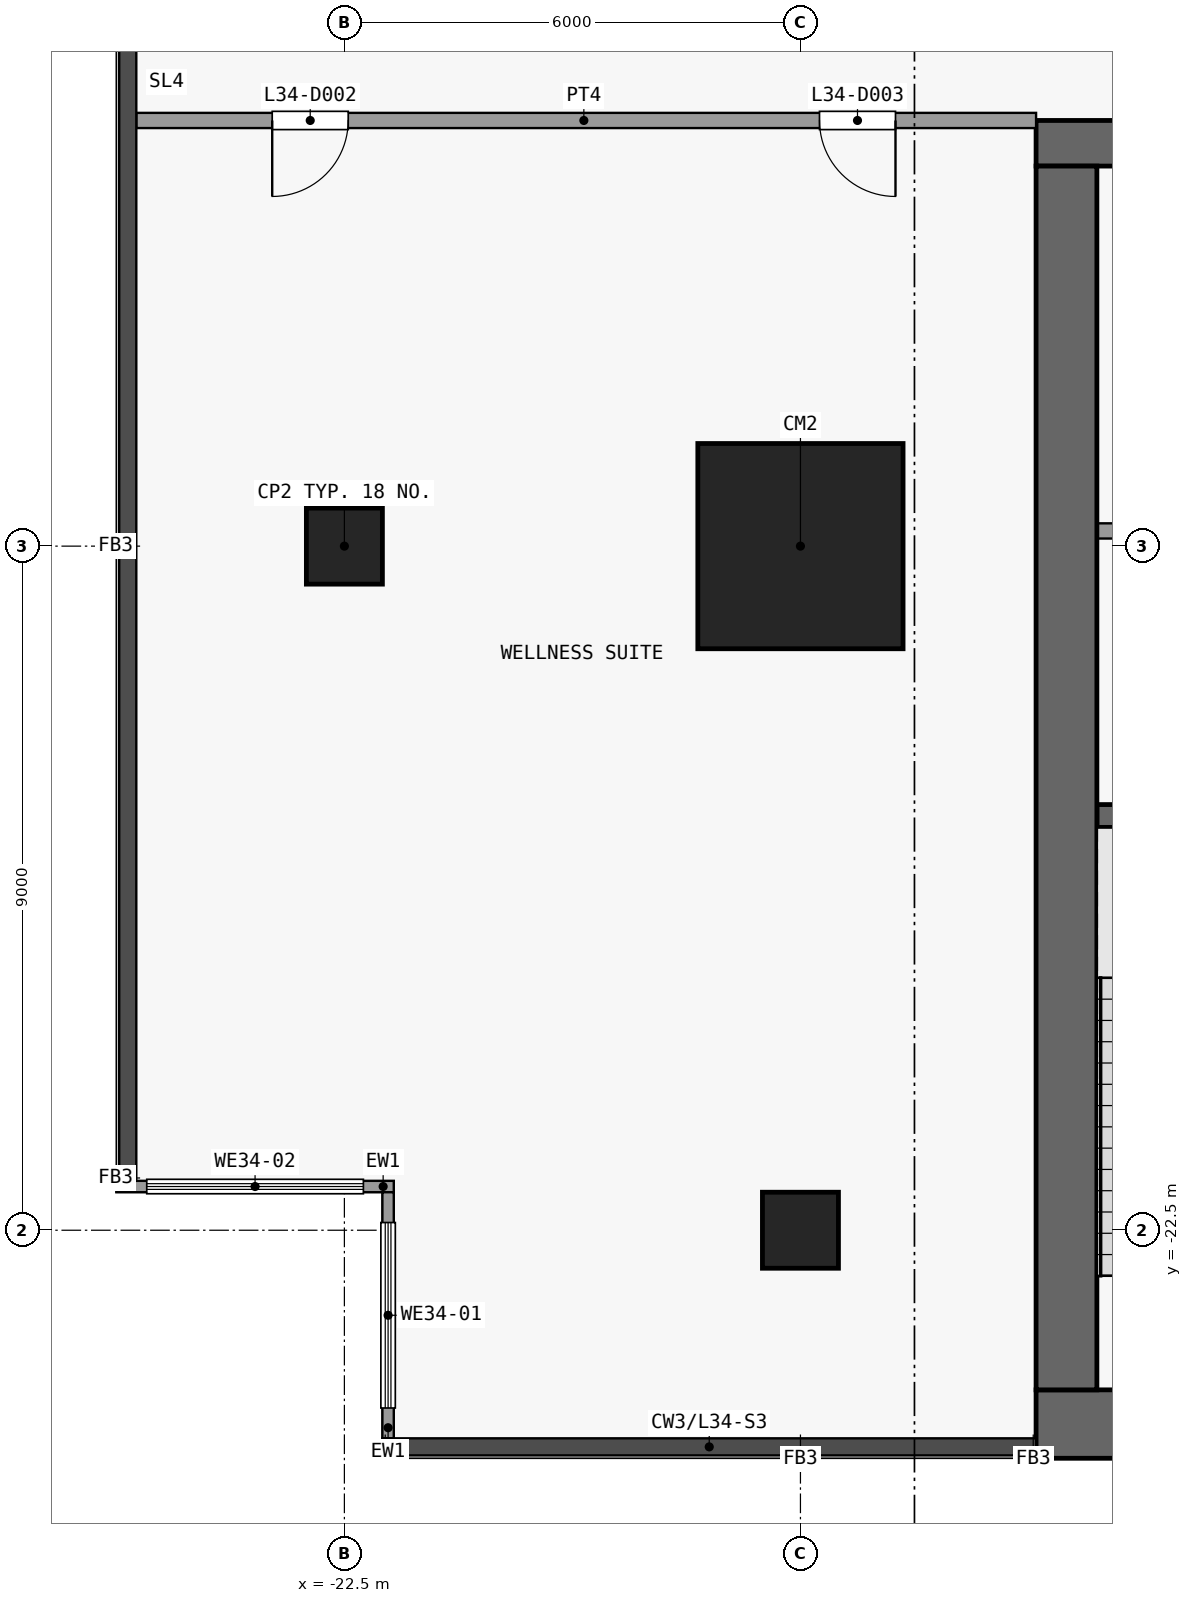
"""IFC4 building model, lengths in metres.
Left out: names, types, materials, properties, quantities, classifications, styles, units other than length and angle.
Written with IfcOpenShell. Run it as: python <this file> out.ifc"""

import sys

from ifc_helpers import new_model, si_unit, direction, frame, frame_2d, origin, origin_2d, place, context, subcontext, project, spatial, rectangle, extrude, element, fill, save


model = new_model("IFC4")
c1 = context("Model", 3, precision=1e-05, world=origin(), true_north=direction((0.0, 1.0)))
c2 = subcontext(c1, "Body", "Model", "MODEL_VIEW")
j1 = project(units=[si_unit("LENGTHUNIT", "METRE"), si_unit("PLANEANGLEUNIT", "RADIAN")], contexts=[c1])
p1 = place(None, origin())
s1 = spatial("IfcSite", under=j1, at=p1, CompositionType="ELEMENT")
p2 = place(p1, origin())
s2 = spatial("IfcBuilding", under=s1, at=p2, CompositionType="ELEMENT")
p3 = place(p2, frame((0.0, 0.0, 138.9)))
s3 = spatial("IfcBuildingStorey", under=s2, at=p3, CompositionType="ELEMENT", Elevation=138.9)
for number, where, z_axis, x_axis in (
    (1, (-22.5, -13.5, 0.0), (0.0, 0.0, 1.0), (1.0, 0.0, 0.0)),
    (2, (-16.5, -22.5, 0.0), (0.0, 0.0, 1.0), (1.0, 0.0, 0.0)),
):
    element("IfcColumn", number, at=place(p3, frame(where, z_axis=z_axis, x_axis=x_axis)), inside=s3, PredefinedType="COLUMN", context=c2, shape_type="SweptSolid", body=[
        extrude(rectangle(XDim=1.0, YDim=1.0, at=origin_2d()), origin(), (0.0, 0.0, 1.0), 5.0),
    ])
p4 = place(p3, frame((-16.5, -13.5, 0.0), z_axis=(0.0, 0.0, 1.0), x_axis=(1.0, 0.0, 0.0)))
e3 = element("IfcColumn", 3, at=p4, inside=s3, PredefinedType="COLUMN", context=c2, shape_type="SweptSolid", body=[
    extrude(rectangle(XDim=2.7, YDim=2.7, at=origin_2d()), origin(), (0.0, 0.0, 1.0), 5.0),
])
p5 = place(p3, frame((-13.4, -25.05, 0.0), z_axis=(0.0, 0.0, 1.0), x_axis=(1.0, 0.0, 0.0)))
e4 = element("IfcWall", 4, at=p5, inside=s3, PredefinedType="SHEAR", context=c2, shape_type="SweptSolid", body=[
    extrude(rectangle(XDim=26.8, YDim=0.9, at=frame_2d((13.4, 0.0))), origin(), (0.0, 0.0, 1.0), 4.55),
])
p6 = place(p3, frame((-13.4, -8.2, 0.0), z_axis=(0.0, 0.0, 1.0), x_axis=(1.0, 0.0, 0.0)))
e5 = element("IfcWall", 5, at=p6, inside=s3, PredefinedType="SHEAR", context=c2, shape_type="SweptSolid", body=[
    extrude(rectangle(XDim=26.8, YDim=0.6, at=frame_2d((13.4, 0.0))), origin(), (0.0, 0.0, 1.0), 4.55),
])
p7 = place(p6, frame((7.7, 0.0, 0.0)))
e6 = element("IfcOpeningElement", 6, at=p7, cuts=e5, PredefinedType="OPENING", context=c2, shape_type="SweptSolid", body=[
    extrude(rectangle(XDim=1.8, YDim=2.1, at=frame_2d((0.9, 1.05))), frame((0.0, 0.31, 0.0), z_axis=(0.0, -1.0, 0.0), x_axis=(1.0, 0.0, 0.0)), (0.0, 0.0, 1.0), 0.62),
])
p8 = place(p6, frame((17.3, 0.0, 0.0)))
e7 = element("IfcOpeningElement", 7, at=p8, cuts=e5, PredefinedType="OPENING", context=c2, shape_type="SweptSolid", body=[
    extrude(rectangle(XDim=1.8, YDim=2.1, at=frame_2d((0.9, 1.05))), frame((0.0, 0.31, 0.0), z_axis=(0.0, -1.0, 0.0), x_axis=(1.0, 0.0, 0.0)), (0.0, 0.0, 1.0), 0.62),
])
p9 = place(p6, frame((2.625, 0.0, 0.0)))
e8 = element("IfcOpeningElement", 8, at=p9, cuts=e5, PredefinedType="OPENING", context=c2, shape_type="SweptSolid", body=[
    extrude(rectangle(XDim=0.9, YDim=2.1, at=frame_2d((0.45, 1.05))), frame((0.0, 0.31, 0.0), z_axis=(0.0, -1.0, 0.0), x_axis=(1.0, 0.0, 0.0)), (0.0, 0.0, 1.0), 0.62),
])
p10 = place(p6, frame((23.275, 0.0, 0.0)))
e9 = element("IfcOpeningElement", 9, at=p10, cuts=e5, PredefinedType="OPENING", context=c2, shape_type="SweptSolid", body=[
    extrude(rectangle(XDim=0.9, YDim=2.1, at=frame_2d((0.45, 1.05))), frame((0.0, 0.31, 0.0), z_axis=(0.0, -1.0, 0.0), x_axis=(1.0, 0.0, 0.0)), (0.0, 0.0, 1.0), 0.62),
])
p11 = place(p3, frame((-13.0, -24.6, 0.0), z_axis=(0.0, 0.0, 1.0), x_axis=(0.0, 1.0, 0.0)))
e10 = element("IfcWall", 10, at=p11, inside=s3, PredefinedType="SHEAR", context=c2, shape_type="SweptSolid", body=[
    extrude(rectangle(XDim=16.1, YDim=0.8, at=frame_2d((8.05, 0.0))), origin(), (0.0, 0.0, 1.0), 4.55),
])
p12 = place(p3, frame((-12.6, -17.05, 0.0), z_axis=(0.0, 0.0, 1.0), x_axis=(1.0, 0.0, 0.0)))
e11 = element("IfcWall", 11, at=p12, inside=s3, PredefinedType="SHEAR", context=c2, shape_type="SweptSolid", body=[
    extrude(rectangle(XDim=3.1, YDim=0.3, at=frame_2d((1.55, 0.0))), origin(), (0.0, 0.0, 1.0), 4.55),
])
p13 = place(p3, frame((-12.6, -13.3, 0.0), z_axis=(0.0, 0.0, 1.0), x_axis=(1.0, 0.0, 0.0)))
e12 = element("IfcWall", 12, at=p13, inside=s3, PredefinedType="PARTITIONING", context=c2, shape_type="SweptSolid", body=[
    extrude(rectangle(XDim=1.45, YDim=0.2, at=frame_2d((0.725, 0.0))), origin(), (0.0, 0.0, 1.0), 4.55),
])
p14 = place(p3, frame((-21.925, -25.238, 0.0), z_axis=(0.0, 0.0, 1.0), x_axis=(0.0, 1.0, 0.0)))
e13 = element("IfcWall", 13, at=p14, inside=s3, PredefinedType="SOLIDWALL", context=c2, shape_type="SweptSolid", body=[
    extrude(rectangle(XDim=3.238, YDim=0.15, at=frame_2d((1.619, 0.0))), origin(), (0.0, 0.0, 1.0), 4.55),
])
p15 = place(p14, frame((0.399, 0.0, 0.9)))
e14 = element("IfcOpeningElement", 14, at=p15, cuts=e13, PredefinedType="OPENING", context=c2, shape_type="SweptSolid", body=[
    extrude(rectangle(XDim=2.44, YDim=2.4, at=frame_2d((1.22, 1.2))), frame((0.0, 0.085, 0.0), z_axis=(0.0, -1.0, 0.0), x_axis=(1.0, 0.0, 0.0)), (0.0, 0.0, 1.0), 0.17),
])
p16 = place(p3, frame((-21.85, -21.925, 0.0), z_axis=(0.0, 0.0, 1.0), x_axis=(-1.0, 0.0, 0.0)))
e15 = element("IfcWall", 15, at=p16, inside=s3, PredefinedType="SOLIDWALL", context=c2, shape_type="SweptSolid", body=[
    extrude(rectangle(XDim=3.65, YDim=0.15, at=frame_2d((1.825, 0.0))), origin(), (0.0, 0.0, 1.0), 4.55),
])
p17 = place(p16, frame((0.4, 0.0, 0.9)))
e16 = element("IfcOpeningElement", 16, at=p17, cuts=e15, PredefinedType="OPENING", context=c2, shape_type="SweptSolid", body=[
    extrude(rectangle(XDim=2.85, YDim=2.4, at=frame_2d((1.425, 1.2))), frame((0.0, 0.085, 0.0), z_axis=(0.0, -1.0, 0.0), x_axis=(1.0, 0.0, 0.0)), (0.0, 0.0, 1.0), 0.17),
])
p18 = place(p3, frame((-25.238, -7.9, 0.0), z_axis=(0.0, 0.0, 1.0), x_axis=(1.0, 0.0, 0.0)))
e17 = element("IfcWall", 17, at=p18, inside=s3, PredefinedType="PARTITIONING", context=c2, shape_type="SweptSolid", body=[
    extrude(rectangle(XDim=11.838, YDim=0.2, at=frame_2d((5.919, 0.0))), origin(), (0.0, 0.0, 1.0), 4.55),
])
p19 = place(p18, frame((1.788, 0.0, 0.0)))
e18 = element("IfcOpeningElement", 18, at=p19, cuts=e17, PredefinedType="OPENING", context=c2, shape_type="SweptSolid", body=[
    extrude(rectangle(XDim=1.0, YDim=2.1, at=frame_2d((0.5, 1.05))), frame((0.0, 0.11, 0.0), z_axis=(0.0, -1.0, 0.0), x_axis=(1.0, 0.0, 0.0)), (0.0, 0.0, 1.0), 0.22),
])
p20 = place(p18, frame((8.988, 0.0, 0.0)))
e19 = element("IfcOpeningElement", 19, at=p20, cuts=e17, PredefinedType="OPENING", context=c2, shape_type="SweptSolid", body=[
    extrude(rectangle(XDim=1.0, YDim=2.1, at=frame_2d((0.5, 1.05))), frame((0.0, 0.11, 0.0), z_axis=(0.0, -1.0, 0.0), x_axis=(1.0, 0.0, 0.0)), (0.0, 0.0, 1.0), 0.22),
])
p21 = place(p15, origin())
e20 = element("IfcWindow", 20, at=p21, inside=s3, PartitioningType="SINGLE_PANEL", PredefinedType="WINDOW", context=c2, shape_type="SweptSolid", body=[
    extrude(rectangle(XDim=2.44, YDim=2.4, at=frame_2d((1.22, 1.2))), frame((0.0, 0.03, 0.0), z_axis=(0.0, -1.0, 0.0), x_axis=(1.0, 0.0, 0.0)), (0.0, 0.0, 1.0), 0.06),
])
fill(e14, e20)
p22 = place(p17, origin())
e21 = element("IfcWindow", 21, at=p22, inside=s3, PartitioningType="SINGLE_PANEL", PredefinedType="WINDOW", context=c2, shape_type="SweptSolid", body=[
    extrude(rectangle(XDim=2.85, YDim=2.4, at=frame_2d((1.425, 1.2))), frame((0.0, 0.03, 0.0), z_axis=(0.0, -1.0, 0.0), x_axis=(1.0, 0.0, 0.0)), (0.0, 0.0, 1.0), 0.06),
])
fill(e16, e21)
p23 = place(p19, origin())
e22 = element("IfcDoor", 22, at=p23, inside=s3, OperationType="SINGLE_SWING_LEFT", PredefinedType="DOOR", context=c2, shape_type="SweptSolid", body=[
    extrude(rectangle(XDim=1.0, YDim=2.1, at=frame_2d((0.5, 1.05))), frame((0.0, 0.025, 0.0), z_axis=(0.0, -1.0, 0.0), x_axis=(1.0, 0.0, 0.0)), (0.0, 0.0, 1.0), 0.05),
])
fill(e18, e22)
p24 = place(p20, origin())
e23 = element("IfcDoor", 23, at=p24, inside=s3, OperationType="SINGLE_SWING_RIGHT", PredefinedType="DOOR", context=c2, shape_type="SweptSolid", body=[
    extrude(rectangle(XDim=1.0, YDim=2.1, at=frame_2d((0.5, 1.05))), frame((0.0, 0.025, 0.0), z_axis=(0.0, -1.0, 0.0), x_axis=(1.0, 0.0, 0.0)), (0.0, 0.0, 1.0), 0.05),
])
fill(e19, e23)
save(model, sys.argv[1])
